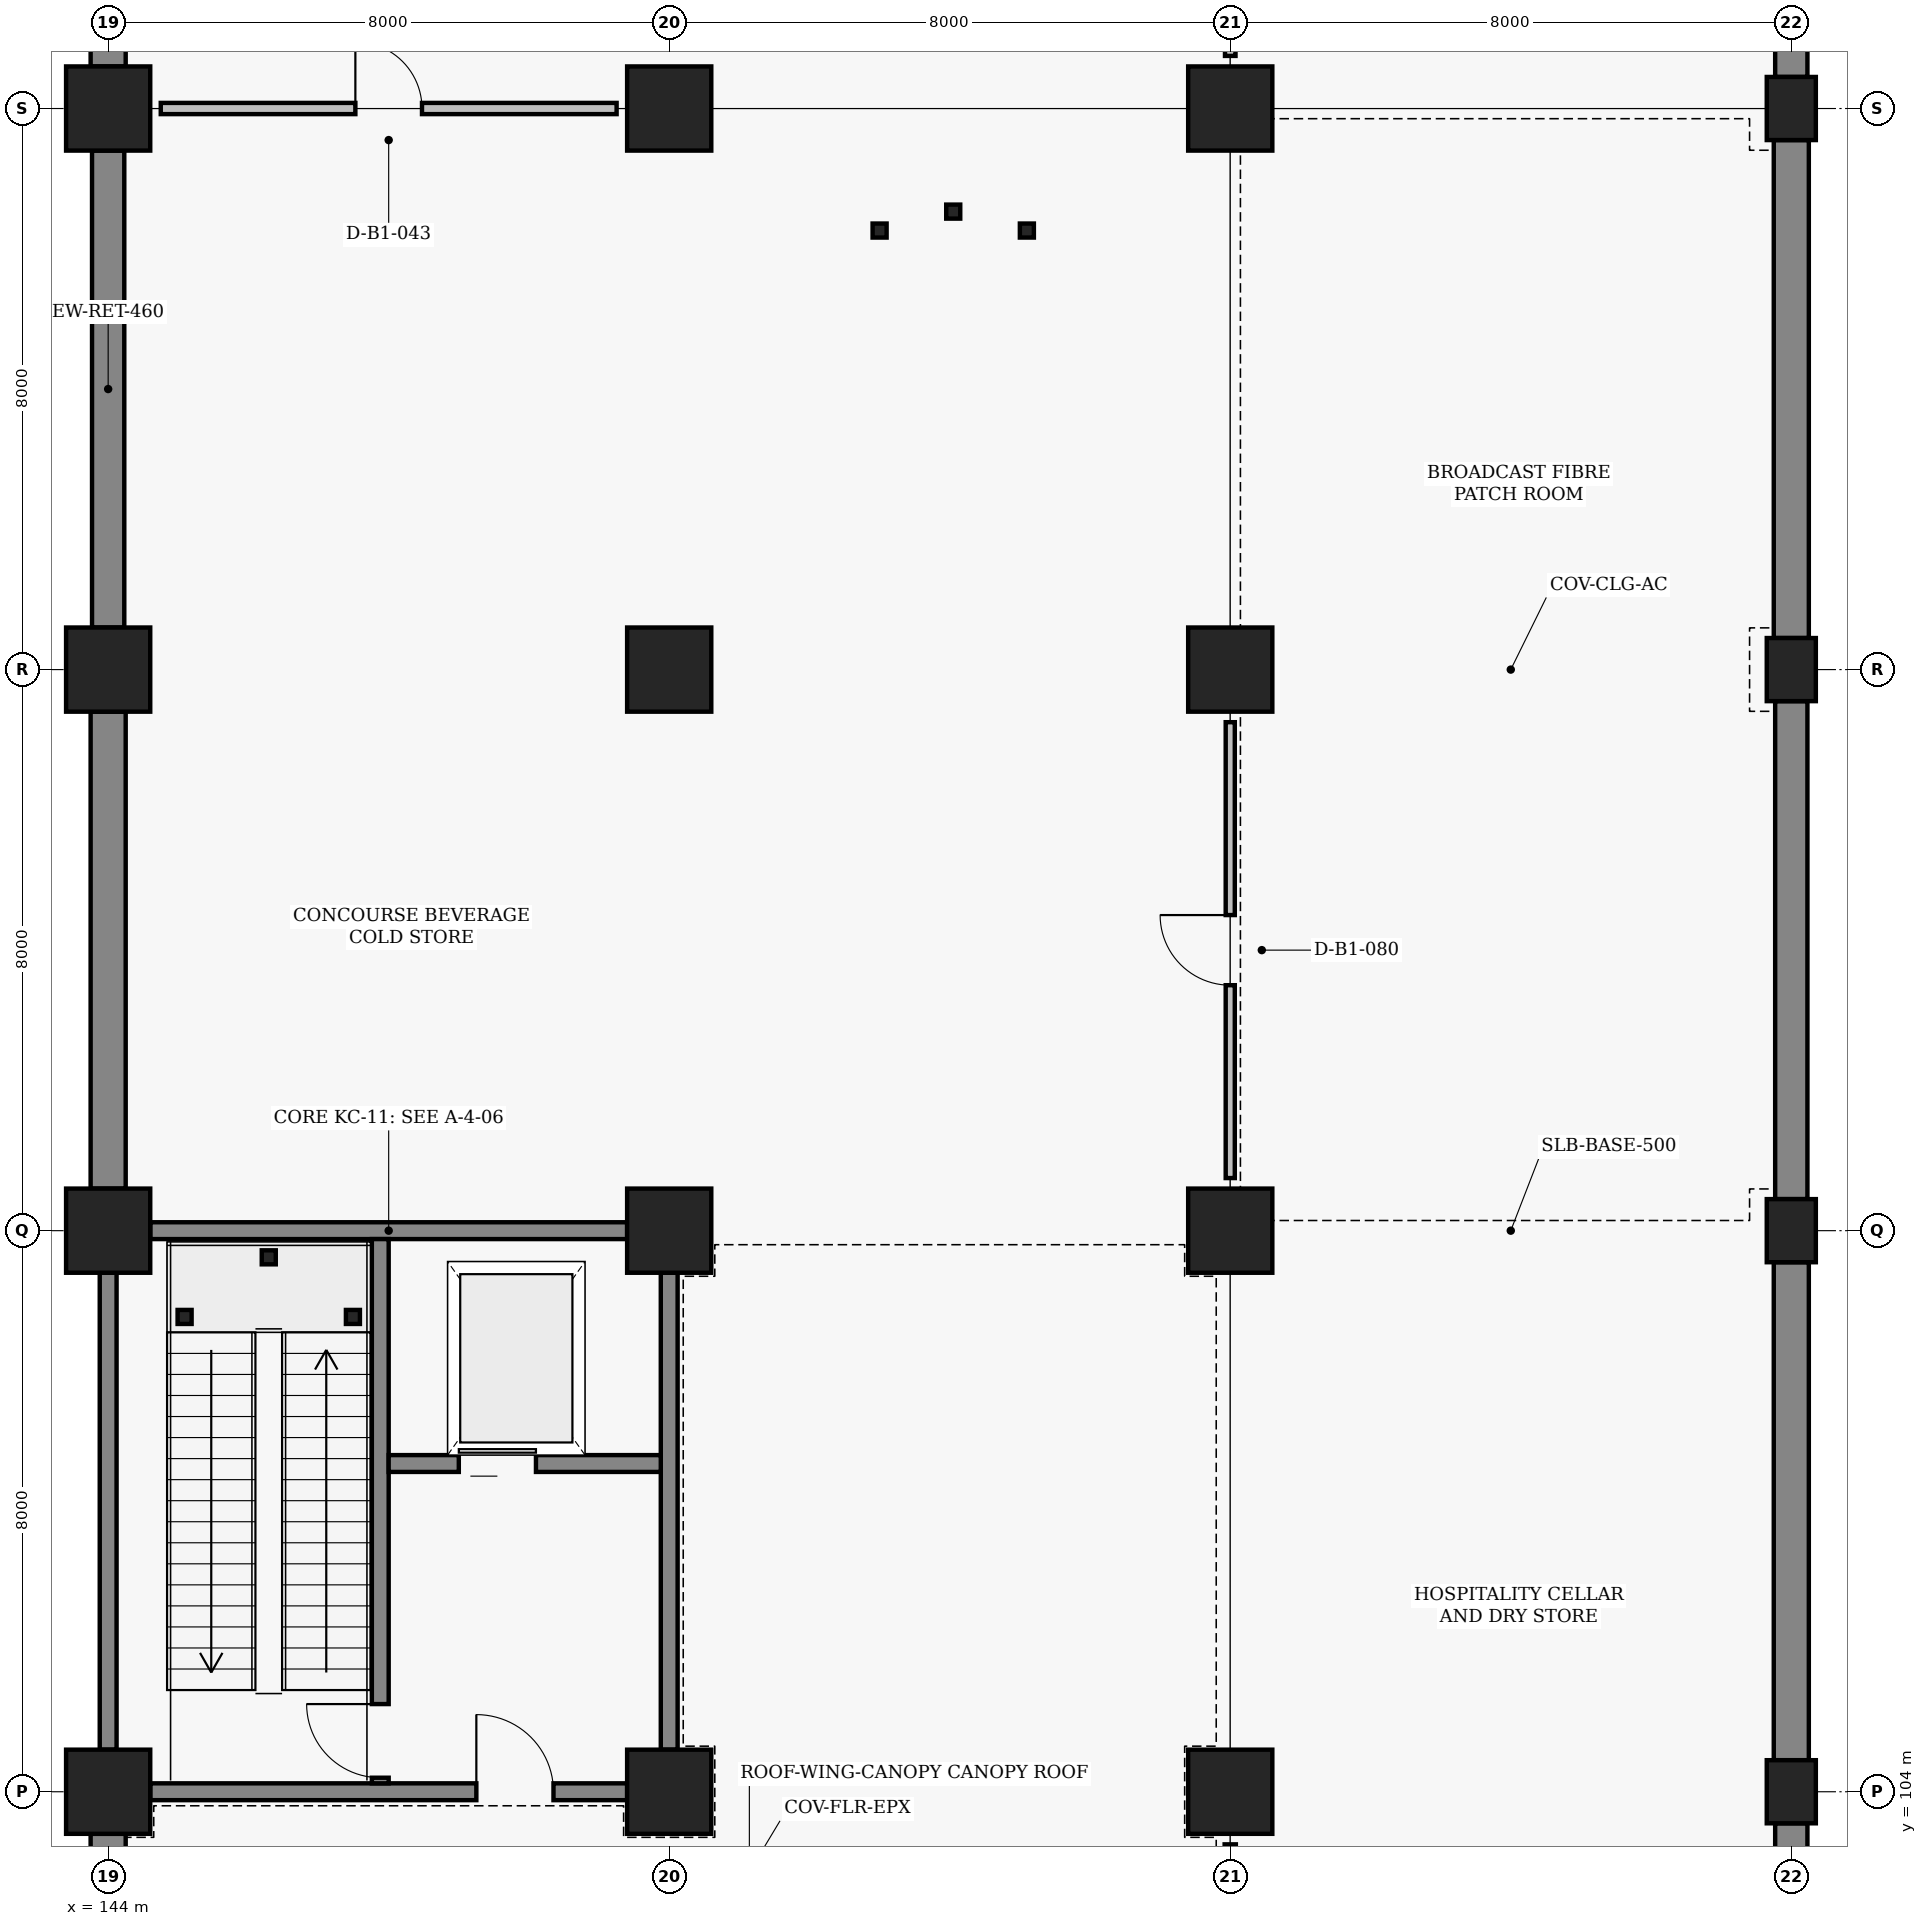
"""IFC4 building model, lengths in metres.
Left out: names, types, materials, properties, quantities, classifications, styles, units other than length and angle.
Written with IfcOpenShell. Run it as: python <this file> out.ifc"""

import sys

from ifc_helpers import new_model, si_unit, direction, frame, frame_2d, origin, origin_2d, place, context, subcontext, project, spatial, rectangle, hollow_rectangle, extrude, element, fill, save


model = new_model("IFC4")
c1 = context("Model", 3, precision=1e-05, world=origin(), true_north=direction((0.0, 1.0)))
c2 = subcontext(c1, "Body", "Model", "MODEL_VIEW")
j1 = project(units=[si_unit("LENGTHUNIT", "METRE"), si_unit("PLANEANGLEUNIT", "RADIAN")], contexts=[c1])
p1 = place(None, origin())
s1 = spatial("IfcSite", under=j1, at=p1, CompositionType="ELEMENT")
p2 = place(p1, origin())
s2 = spatial("IfcBuilding", under=s1, at=p2, CompositionType="ELEMENT")
p3 = place(p2, frame((0.0, 0.0, -5.4)))
s3 = spatial("IfcBuildingStorey", under=s2, at=p3, CompositionType="ELEMENT", Elevation=-5.4)
for number, where, z_axis, x_axis in (
    (1, (144.0, 104.0, 0.0), (0.0, 0.0, 1.0), (1.0, 0.0, 0.0)),
    (2, (144.0, 112.0, 0.0), (0.0, 0.0, 1.0), (1.0, 0.0, 0.0)),
    (3, (144.0, 120.0, 0.0), (0.0, 0.0, 1.0), (1.0, 0.0, 0.0)),
    (4, (144.0, 128.0, 0.0), (0.0, 0.0, 1.0), (1.0, 0.0, 0.0)),
    (5, (152.0, 104.0, 0.0), (0.0, 0.0, 1.0), (1.0, 0.0, 0.0)),
    (6, (152.0, 112.0, 0.0), (0.0, 0.0, 1.0), (1.0, 0.0, 0.0)),
    (7, (152.0, 120.0, 0.0), (0.0, 0.0, 1.0), (1.0, 0.0, 0.0)),
    (8, (152.0, 128.0, 0.0), (0.0, 0.0, 1.0), (1.0, 0.0, 0.0)),
    (9, (160.0, 104.0, 0.0), (0.0, 0.0, 1.0), (1.0, 0.0, 0.0)),
    (10, (160.0, 112.0, 0.0), (0.0, 0.0, 1.0), (1.0, 0.0, 0.0)),
    (11, (160.0, 120.0, 0.0), (0.0, 0.0, 1.0), (1.0, 0.0, 0.0)),
    (12, (160.0, 128.0, 0.0), (0.0, 0.0, 1.0), (1.0, 0.0, 0.0)),
):
    element("IfcColumn", number, at=place(p3, frame(where, z_axis=z_axis, x_axis=x_axis)), inside=s3, PredefinedType="COLUMN", context=c2, shape_type="SweptSolid", body=[
        extrude(rectangle(XDim=1.2, YDim=1.2, at=origin_2d()), origin(), (0.0, 0.0, 1.0), 5.4),
    ])
for number, where, z_axis, x_axis in (
    (13, (168.0, 104.0, 0.0), (0.0, 0.0, 1.0), (1.0, 0.0, 0.0)),
    (14, (168.0, 112.0, 0.0), (0.0, 0.0, 1.0), (1.0, 0.0, 0.0)),
    (15, (168.0, 120.0, 0.0), (0.0, 0.0, 1.0), (1.0, 0.0, 0.0)),
    (16, (168.0, 128.0, 0.0), (0.0, 0.0, 1.0), (1.0, 0.0, 0.0)),
):
    element("IfcColumn", number, at=place(p3, frame(where, z_axis=z_axis, x_axis=x_axis)), inside=s3, PredefinedType="COLUMN", context=c2, shape_type="SweptSolid", body=[
        extrude(rectangle(XDim=0.7, YDim=0.9, at=origin_2d()), origin(), (0.0, 0.0, 1.0), 5.4),
    ])
for number, where, z_axis, x_axis in (
    (17, (144.0, 96.6, 0.0), (0.0, 0.0, 1.0), (0.0, 1.0, 0.0)),
    (18, (144.0, 112.6, 0.0), (0.0, 0.0, 1.0), (0.0, 1.0, 0.0)),
):
    element("IfcWall", number, at=place(p3, frame(where, z_axis=z_axis, x_axis=x_axis)), inside=s3, PredefinedType="STANDARD", context=c2, shape_type="SweptSolid", body=[
        extrude(rectangle(XDim=6.8, YDim=0.5, at=frame_2d((3.4, 0.0))), origin(), (0.0, 0.0, 1.0), 4.24),
    ])
p4 = place(p3, frame((144.0, 120.6, 0.0), z_axis=(0.0, 0.0, 1.0), x_axis=(0.0, 1.0, 0.0)))
e19 = element("IfcWall", 19, at=p4, inside=s3, PredefinedType="STANDARD", context=c2, shape_type="SweptSolid", body=[
    extrude(rectangle(XDim=6.8, YDim=0.46, at=frame_2d((3.4, 0.0))), origin(), (0.0, 0.0, 1.0), 4.24),
])
p5 = place(p3, frame((144.0, 128.6, 0.0), z_axis=(0.0, 0.0, 1.0), x_axis=(0.0, 1.0, 0.0)))
e20 = element("IfcWall", 20, at=p5, inside=s3, PredefinedType="STANDARD", context=c2, shape_type="SweptSolid", body=[
    extrude(rectangle(XDim=6.8, YDim=0.5, at=frame_2d((3.4, 0.0))), origin(), (0.0, 0.0, 1.0), 3.69),
])
p6 = place(p3, frame((168.0, 96.45, 0.0), z_axis=(0.0, 0.0, 1.0), x_axis=(0.0, 1.0, 0.0)))
e21 = element("IfcWall", 21, at=p6, inside=s3, PredefinedType="STANDARD", context=c2, shape_type="SweptSolid", body=[
    extrude(rectangle(XDim=7.1, YDim=0.46, at=frame_2d((3.55, 0.0))), origin(), (0.0, 0.0, 1.0), 4.24),
])
p7 = place(p3, frame((168.0, 104.45, 0.0), z_axis=(0.0, 0.0, 1.0), x_axis=(0.0, 1.0, 0.0)))
e22 = element("IfcWall", 22, at=p7, inside=s3, PredefinedType="STANDARD", context=c2, shape_type="SweptSolid", body=[
    extrude(rectangle(XDim=7.1, YDim=0.5, at=frame_2d((3.55, 0.0))), origin(), (0.0, 0.0, 1.0), 4.24),
])
p8 = place(p3, frame((168.0, 112.45, 0.0), z_axis=(0.0, 0.0, 1.0), x_axis=(0.0, 1.0, 0.0)))
e23 = element("IfcWall", 23, at=p8, inside=s3, PredefinedType="STANDARD", context=c2, shape_type="SweptSolid", body=[
    extrude(rectangle(XDim=7.1, YDim=0.46, at=frame_2d((3.55, 0.0))), origin(), (0.0, 0.0, 1.0), 3.69),
])
p9 = place(p3, frame((168.0, 120.45, 0.0), z_axis=(0.0, 0.0, 1.0), x_axis=(0.0, 1.0, 0.0)))
e24 = element("IfcWall", 24, at=p9, inside=s3, PredefinedType="STANDARD", context=c2, shape_type="SweptSolid", body=[
    extrude(rectangle(XDim=7.1, YDim=0.5, at=frame_2d((3.55, 0.0))), origin(), (0.0, 0.0, 1.0), 3.69),
])
p10 = place(p3, frame((168.0, 128.45, 0.0), z_axis=(0.0, 0.0, 1.0), x_axis=(0.0, 1.0, 0.0)))
e25 = element("IfcWall", 25, at=p10, inside=s3, PredefinedType="STANDARD", context=c2, shape_type="SweptSolid", body=[
    extrude(rectangle(XDim=7.1, YDim=0.46, at=frame_2d((3.55, 0.0))), origin(), (0.0, 0.0, 1.0), 4.24),
])
p11 = place(p3, frame((144.6, 104.0, 0.0), z_axis=(0.0, 0.0, 1.0), x_axis=(1.0, 0.0, 0.0)))
e26 = element("IfcWall", 26, at=p11, inside=s3, PredefinedType="SHEAR", context=c2, shape_type="SweptSolid", body=[
    extrude(rectangle(XDim=6.8, YDim=0.24, at=frame_2d((3.4, 0.0))), origin(), (0.0, 0.0, 1.0), 4.24),
])
p12 = place(p11, frame((4.65, 0.0, 0.0)))
e27 = element("IfcOpeningElement", 27, at=p12, cuts=e26, PredefinedType="OPENING", context=c2, shape_type="SweptSolid", body=[
    extrude(rectangle(XDim=1.1, YDim=2.2, at=frame_2d((0.55, 1.1))), frame((0.0, 0.13, 0.0), z_axis=(0.0, -1.0, 0.0), x_axis=(1.0, 0.0, 0.0)), (0.0, 0.0, 1.0), 0.26),
])
for number, where, z_axis, x_axis in (
    (28, (144.6, 112.0, 0.0), (0.0, 0.0, 1.0), (1.0, 0.0, 0.0)),
    (29, (144.0, 104.6, 0.0), (0.0, 0.0, 1.0), (0.0, 1.0, 0.0)),
):
    element("IfcWall", number, at=place(p3, frame(where, z_axis=z_axis, x_axis=x_axis)), inside=s3, PredefinedType="SHEAR", context=c2, shape_type="SweptSolid", body=[
        extrude(rectangle(XDim=6.8, YDim=0.24, at=frame_2d((3.4, 0.0))), origin(), (0.0, 0.0, 1.0), 4.24),
    ])
p13 = place(p3, frame((152.0, 104.6, 0.0), z_axis=(0.0, 0.0, 1.0), x_axis=(0.0, 1.0, 0.0)))
e30 = element("IfcWall", 30, at=p13, inside=s3, PredefinedType="SHEAR", context=c2, shape_type="SweptSolid", body=[
    extrude(rectangle(XDim=6.8, YDim=0.24, at=frame_2d((3.4, 0.0))), origin(), (0.0, 0.0, 1.0), 4.39),
])
p14 = place(p3, frame((147.88, 104.12, 0.0), z_axis=(0.0, 0.0, 1.0), x_axis=(0.0, 1.0, 0.0)))
e31 = element("IfcWall", 31, at=p14, inside=s3, PredefinedType="SHEAR", context=c2, shape_type="SweptSolid", body=[
    extrude(rectangle(XDim=7.76, YDim=0.24, at=frame_2d((3.88, 0.0))), origin(), (0.0, 0.0, 1.0), 4.59),
])
p15 = place(p14, frame((0.08, 0.0, 0.0)))
e32 = element("IfcOpeningElement", 32, at=p15, cuts=e31, PredefinedType="OPENING", context=c2, shape_type="SweptSolid", body=[
    extrude(rectangle(XDim=1.05, YDim=2.15, at=frame_2d((0.525, 1.075))), frame((0.0, 0.13, 0.0), z_axis=(0.0, -1.0, 0.0), x_axis=(1.0, 0.0, 0.0)), (0.0, 0.0, 1.0), 0.26),
])
p16 = place(p3, frame((148.0, 108.68, 0.0), z_axis=(0.0, 0.0, 1.0), x_axis=(1.0, 0.0, 0.0)))
e33 = element("IfcWall", 33, at=p16, inside=s3, PredefinedType="SHEAR", context=c2, shape_type="SweptSolid", body=[
    extrude(rectangle(XDim=3.88, YDim=0.24, at=frame_2d((1.94, 0.0))), origin(), (0.0, 0.0, 1.0), 4.39),
])
p17 = place(p16, frame((1.0, 0.0, 0.0)))
e34 = element("IfcOpeningElement", 34, at=p17, cuts=e33, PredefinedType="OPENING", context=c2, shape_type="SweptSolid", body=[
    extrude(rectangle(XDim=1.1, YDim=2.15, at=frame_2d((0.55, 1.075))), frame((0.0, 0.13, 0.0), z_axis=(0.0, -1.0, 0.0), x_axis=(1.0, 0.0, 0.0)), (0.0, 0.0, 1.0), 0.26),
])
for number, where, z_axis, x_axis in (
    (35, (145.09, 110.77, 0.0), (0.0, 0.0, 1.0), (1.0, 0.0, 0.0)),
    (36, (147.49, 110.77, 0.0), (0.0, 0.0, 1.0), (1.0, 0.0, 0.0)),
    (37, (146.29, 111.62, 0.0), (0.0, 0.0, 1.0), (1.0, 0.0, 0.0)),
):
    element("IfcColumn", number, at=place(p3, frame(where, z_axis=z_axis, x_axis=x_axis)), inside=s3, PredefinedType="COLUMN", context=c2, shape_type="SweptSolid", body=[
        extrude(hollow_rectangle(XDim=0.2, YDim=0.2, WallThickness=0.009, at=origin_2d()), origin(), (0.0, 0.0, 1.0), 2.5),
    ])
for number, where, z_axis, x_axis in (
    (38, (155.0, 126.26, 0.0), (0.0, 0.0, 1.0), (1.0, 0.0, 0.0)),
    (39, (157.1, 126.26, 0.0), (0.0, 0.0, 1.0), (1.0, 0.0, 0.0)),
    (40, (156.05, 126.53, 0.0), (0.0, 0.0, 1.0), (1.0, 0.0, 0.0)),
):
    element("IfcColumn", number, at=place(p3, frame(where, z_axis=z_axis, x_axis=x_axis)), inside=s3, PredefinedType="COLUMN", context=c2, shape_type="SweptSolid", body=[
        extrude(hollow_rectangle(XDim=0.2, YDim=0.2, WallThickness=0.009, at=origin_2d()), origin(), (0.0, 0.0, 1.0), 5.4),
    ])
p18 = place(p3, frame((144.75, 128.0, 0.0), z_axis=(0.0, 0.0, 1.0), x_axis=(1.0, 0.0, 0.0)))
e41 = element("IfcWall", 41, at=p18, inside=s3, PredefinedType="PARTITIONING", context=c2, shape_type="SweptSolid", body=[
    extrude(rectangle(XDim=6.5, YDim=0.16, at=frame_2d((3.25, 0.0))), origin(), (0.0, 0.0, 1.0), 3.69),
])
p19 = place(p18, frame((2.775, 0.0, 0.0)))
e42 = element("IfcOpeningElement", 42, at=p19, cuts=e41, PredefinedType="OPENING", context=c2, shape_type="SweptSolid", body=[
    extrude(rectangle(XDim=0.95, YDim=2.1, at=frame_2d((0.475, 1.05))), frame((0.0, 0.09, 0.0), z_axis=(0.0, -1.0, 0.0), x_axis=(1.0, 0.0, 0.0)), (0.0, 0.0, 1.0), 0.18),
])
p20 = place(p3, frame((160.0, 96.75, 0.0), z_axis=(0.0, 0.0, 1.0), x_axis=(0.0, 1.0, 0.0)))
e43 = element("IfcWall", 43, at=p20, inside=s3, PredefinedType="PARTITIONING", context=c2, shape_type="SweptSolid", body=[
    extrude(rectangle(XDim=6.5, YDim=0.16, at=frame_2d((3.25, 0.0))), origin(), (0.0, 0.0, 1.0), 4.39),
])
p21 = place(p20, frame((2.775, 0.0, 0.0)))
e44 = element("IfcOpeningElement", 44, at=p21, cuts=e43, PredefinedType="OPENING", context=c2, shape_type="SweptSolid", body=[
    extrude(rectangle(XDim=0.95, YDim=2.1, at=frame_2d((0.475, 1.05))), frame((0.0, 0.09, 0.0), z_axis=(0.0, -1.0, 0.0), x_axis=(1.0, 0.0, 0.0)), (0.0, 0.0, 1.0), 0.18),
])
p22 = place(p3, frame((160.0, 112.75, 0.0), z_axis=(0.0, 0.0, 1.0), x_axis=(0.0, 1.0, 0.0)))
e45 = element("IfcWall", 45, at=p22, inside=s3, PredefinedType="PARTITIONING", context=c2, shape_type="SweptSolid", body=[
    extrude(rectangle(XDim=6.5, YDim=0.13, at=frame_2d((3.25, 0.0))), origin(), (0.0, 0.0, 1.0), 3.69),
])
p23 = place(p22, frame((2.75, 0.0, 0.0)))
e46 = element("IfcOpeningElement", 46, at=p23, cuts=e45, PredefinedType="OPENING", context=c2, shape_type="SweptSolid", body=[
    extrude(rectangle(XDim=1.0, YDim=2.1, at=frame_2d((0.5, 1.05))), frame((0.0, 0.075, 0.0), z_axis=(0.0, -1.0, 0.0), x_axis=(1.0, 0.0, 0.0)), (0.0, 0.0, 1.0), 0.15),
])
p24 = place(p3, frame((160.0, 128.75, 0.0), z_axis=(0.0, 0.0, 1.0), x_axis=(0.0, 1.0, 0.0)))
e47 = element("IfcWall", 47, at=p24, inside=s3, PredefinedType="PARTITIONING", context=c2, shape_type="SweptSolid", body=[
    extrude(rectangle(XDim=6.5, YDim=0.15, at=frame_2d((3.25, 0.0))), origin(), (0.0, 0.0, 1.0), 3.69),
])
p25 = place(p24, frame((2.725, 0.0, 0.0)))
e48 = element("IfcOpeningElement", 48, at=p25, cuts=e47, PredefinedType="OPENING", context=c2, shape_type="SweptSolid", body=[
    extrude(rectangle(XDim=1.05, YDim=2.15, at=frame_2d((0.525, 1.075))), frame((0.0, 0.085, 0.0), z_axis=(0.0, -1.0, 0.0), x_axis=(1.0, 0.0, 0.0)), (0.0, 0.0, 1.0), 0.17),
])
p26 = place(p12, origin())
e49 = element("IfcDoor", 49, at=p26, inside=s3, OperationType="SINGLE_SWING_LEFT", PredefinedType="DOOR", context=c2, shape_type="SweptSolid", body=[
    extrude(rectangle(XDim=1.1, YDim=2.2, at=frame_2d((0.55, 1.1))), frame((0.0, 0.025, 0.0), z_axis=(0.0, -1.0, 0.0), x_axis=(1.0, 0.0, 0.0)), (0.0, 0.0, 1.0), 0.05),
])
fill(e27, e49)
p27 = place(p15, origin())
e50 = element("IfcDoor", 50, at=p27, inside=s3, OperationType="SINGLE_SWING_RIGHT", PredefinedType="DOOR", context=c2, shape_type="SweptSolid", body=[
    extrude(rectangle(XDim=1.05, YDim=2.15, at=frame_2d((0.525, 1.075))), frame((0.0, 0.025, 0.0), z_axis=(0.0, -1.0, 0.0), x_axis=(1.0, 0.0, 0.0)), (0.0, 0.0, 1.0), 0.05),
])
fill(e32, e50)
p28 = place(p17, origin())
e51 = element("IfcDoor", 51, at=p28, inside=s3, OperationType="SLIDING_TO_LEFT", PredefinedType="DOOR", context=c2, shape_type="SweptSolid", body=[
    extrude(rectangle(XDim=1.1, YDim=2.15, at=frame_2d((0.55, 1.075))), frame((0.0, 0.025, 0.0), z_axis=(0.0, -1.0, 0.0), x_axis=(1.0, 0.0, 0.0)), (0.0, 0.0, 1.0), 0.05),
])
fill(e34, e51)
p29 = place(p19, origin())
e52 = element("IfcDoor", 52, at=p29, inside=s3, OperationType="SINGLE_SWING_LEFT", PredefinedType="DOOR", context=c2, shape_type="SweptSolid", body=[
    extrude(rectangle(XDim=0.95, YDim=2.1, at=frame_2d((0.475, 1.05))), frame((0.0, 0.025, 0.0), z_axis=(0.0, -1.0, 0.0), x_axis=(1.0, 0.0, 0.0)), (0.0, 0.0, 1.0), 0.05),
])
fill(e42, e52)
p30 = place(p23, origin())
e53 = element("IfcDoor", 53, at=p30, inside=s3, OperationType="SINGLE_SWING_RIGHT", PredefinedType="DOOR", context=c2, shape_type="SweptSolid", body=[
    extrude(rectangle(XDim=1.0, YDim=2.1, at=frame_2d((0.5, 1.05))), frame((0.0, 0.025, 0.0), z_axis=(0.0, -1.0, 0.0), x_axis=(1.0, 0.0, 0.0)), (0.0, 0.0, 1.0), 0.05),
])
fill(e46, e53)
save(model, sys.argv[1])
